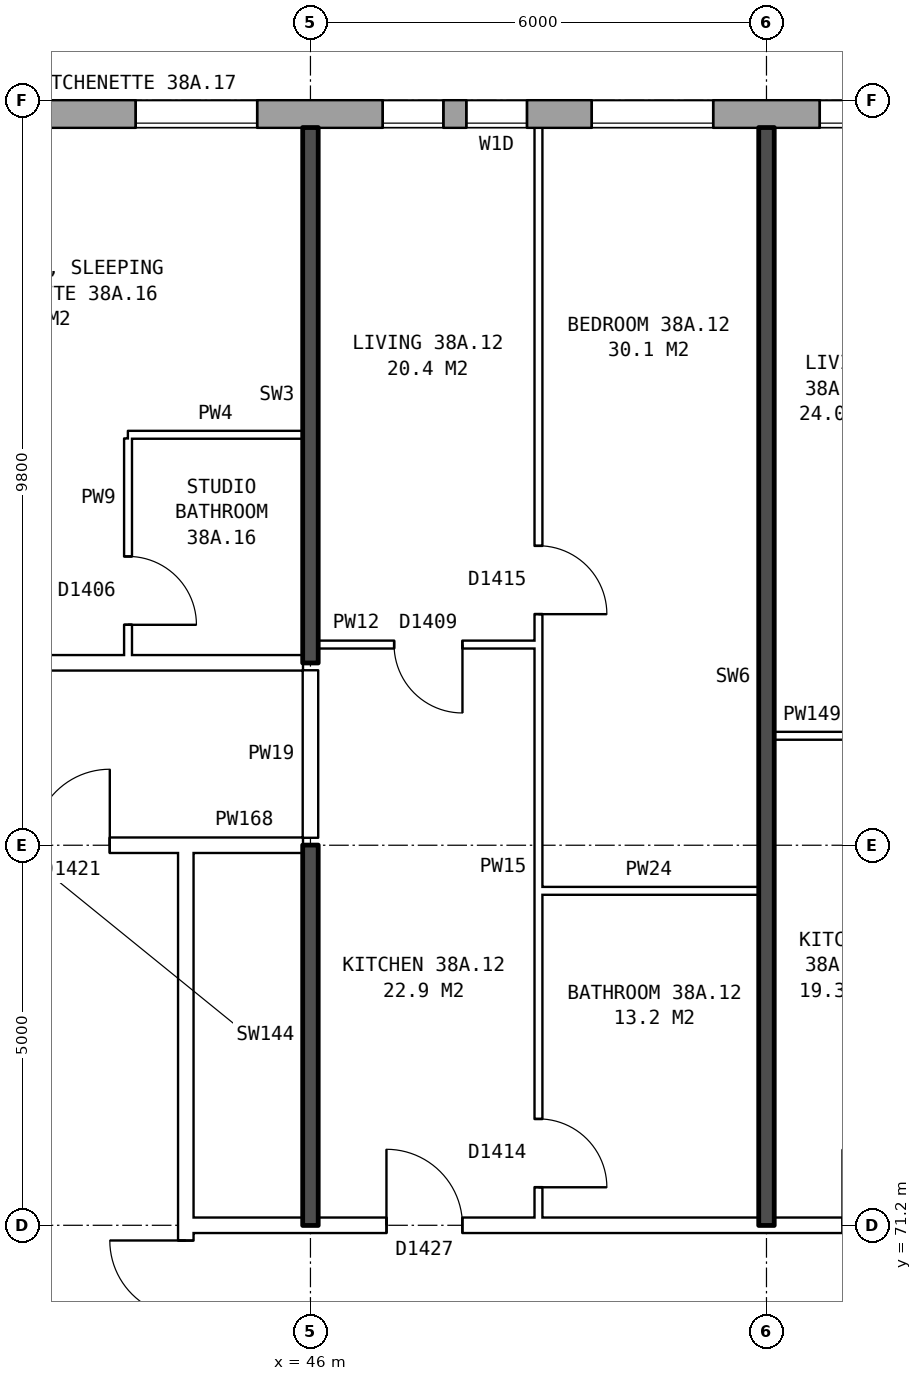
"""IFC4 building model, lengths in metres.
Left out: names, types, materials, properties, quantities, classifications, styles, units other than length and angle.
Written with IfcOpenShell. Run it as: python <this file> out.ifc"""

import sys

from ifc_helpers import new_model, si_unit, direction, frame, frame_2d, origin, place, context, subcontext, project, spatial, rectangle, extrude, element, fill, save


model = new_model("IFC4")
c1 = context("Model", 3, precision=1e-05, world=origin(), true_north=direction((0.0, 1.0)))
c2 = subcontext(c1, "Body", "Model", "MODEL_VIEW")
j1 = project(units=[si_unit("LENGTHUNIT", "METRE"), si_unit("PLANEANGLEUNIT", "RADIAN")], contexts=[c1])
p1 = place(None, origin())
s1 = spatial("IfcSite", under=j1, at=p1, CompositionType="ELEMENT")
p2 = place(p1, origin())
s2 = spatial("IfcBuilding", under=s1, at=p2, CompositionType="ELEMENT")
p3 = place(p2, frame((0.0, 0.0, 136.1)))
s3 = spatial("IfcBuildingStorey", under=s2, at=p3, CompositionType="ELEMENT", Elevation=136.1)
p4 = place(p3, frame((72.925, 85.82, 0.0), z_axis=(0.0, 0.0, 1.0), x_axis=(-1.0, 0.0, 0.0)))
e1 = element("IfcWall", 1, at=p4, inside=s3, PredefinedType="STANDARD", context=c2, shape_type="SweptSolid", body=[
    extrude(rectangle(XDim=43.101, YDim=0.36, at=frame_2d((21.55, 0.0))), origin(), (0.0, 0.0, 1.0), 2.85),
])
p5 = place(p4, frame((0.625, 0.0, 0.8)))
e2 = element("IfcOpeningElement", 2, at=p5, cuts=e1, PredefinedType="OPENING", context=c2, shape_type="SweptSolid", body=[
    extrude(rectangle(XDim=1.6, YDim=1.8, at=frame_2d((0.8, 0.9))), frame((0.0, 0.19, 0.0), z_axis=(0.0, -1.0, 0.0), x_axis=(1.0, 0.0, 0.0)), (0.0, 0.0, 1.0), 0.38),
])
p6 = place(p4, frame((3.625, 0.0, 0.8)))
e3 = element("IfcOpeningElement", 3, at=p6, cuts=e1, PredefinedType="OPENING", context=c2, shape_type="SweptSolid", body=[
    extrude(rectangle(XDim=1.6, YDim=1.8, at=frame_2d((0.8, 0.9))), frame((0.0, 0.19, 0.0), z_axis=(0.0, -1.0, 0.0), x_axis=(1.0, 0.0, 0.0)), (0.0, 0.0, 1.0), 0.38),
])
p7 = place(p4, frame((6.625, 0.0, 0.8)))
e4 = element("IfcOpeningElement", 4, at=p7, cuts=e1, PredefinedType="OPENING", context=c2, shape_type="SweptSolid", body=[
    extrude(rectangle(XDim=1.6, YDim=1.8, at=frame_2d((0.8, 0.9))), frame((0.0, 0.19, 0.0), z_axis=(0.0, -1.0, 0.0), x_axis=(1.0, 0.0, 0.0)), (0.0, 0.0, 1.0), 0.38),
])
p8 = place(p4, frame((9.625, 0.0, 0.8)))
e5 = element("IfcOpeningElement", 5, at=p8, cuts=e1, PredefinedType="OPENING", context=c2, shape_type="SweptSolid", body=[
    extrude(rectangle(XDim=1.6, YDim=1.8, at=frame_2d((0.8, 0.9))), frame((0.0, 0.19, 0.0), z_axis=(0.0, -1.0, 0.0), x_axis=(1.0, 0.0, 0.0)), (0.0, 0.0, 1.0), 0.38),
])
p9 = place(p4, frame((12.625, 0.0, 0.8)))
e6 = element("IfcOpeningElement", 6, at=p9, cuts=e1, PredefinedType="OPENING", context=c2, shape_type="SweptSolid", body=[
    extrude(rectangle(XDim=1.6, YDim=1.8, at=frame_2d((0.8, 0.9))), frame((0.0, 0.19, 0.0), z_axis=(0.0, -1.0, 0.0), x_axis=(1.0, 0.0, 0.0)), (0.0, 0.0, 1.0), 0.38),
])
p10 = place(p4, frame((15.125, 0.0, 1.35)))
e7 = element("IfcOpeningElement", 7, at=p10, cuts=e1, PredefinedType="OPENING", context=c2, shape_type="SweptSolid", body=[
    extrude(rectangle(XDim=1.0, YDim=1.2, at=frame_2d((0.5, 0.6))), frame((0.0, 0.19, 0.0), z_axis=(0.0, -1.0, 0.0), x_axis=(1.0, 0.0, 0.0)), (0.0, 0.0, 1.0), 0.38),
])
p11 = place(p4, frame((18.625, 0.0, 0.8)))
e8 = element("IfcOpeningElement", 8, at=p11, cuts=e1, PredefinedType="OPENING", context=c2, shape_type="SweptSolid", body=[
    extrude(rectangle(XDim=1.6, YDim=1.8, at=frame_2d((0.8, 0.9))), frame((0.0, 0.19, 0.0), z_axis=(0.0, -1.0, 0.0), x_axis=(1.0, 0.0, 0.0)), (0.0, 0.0, 1.0), 0.38),
])
p12 = place(p4, frame((21.625, 0.0, 0.8)))
e9 = element("IfcOpeningElement", 9, at=p12, cuts=e1, PredefinedType="OPENING", context=c2, shape_type="SweptSolid", body=[
    extrude(rectangle(XDim=1.6, YDim=1.8, at=frame_2d((0.8, 0.9))), frame((0.0, 0.19, 0.0), z_axis=(0.0, -1.0, 0.0), x_axis=(1.0, 0.0, 0.0)), (0.0, 0.0, 1.0), 0.38),
])
p13 = place(p4, frame((24.075, 0.0, 0.35)))
e10 = element("IfcOpeningElement", 10, at=p13, cuts=e1, PredefinedType="OPENING", context=c2, shape_type="SweptSolid", body=[
    extrude(rectangle(XDim=0.8, YDim=1.8, at=frame_2d((0.4, 0.9))), frame((0.0, 0.19, 0.0), z_axis=(0.0, -1.0, 0.0), x_axis=(1.0, 0.0, 0.0)), (0.0, 0.0, 1.0), 0.38),
])
p14 = place(p4, frame((27.625, 0.0, 0.8)))
e11 = element("IfcOpeningElement", 11, at=p14, cuts=e1, PredefinedType="OPENING", context=c2, shape_type="SweptSolid", body=[
    extrude(rectangle(XDim=1.6, YDim=1.8, at=frame_2d((0.8, 0.9))), frame((0.0, 0.19, 0.0), z_axis=(0.0, -1.0, 0.0), x_axis=(1.0, 0.0, 0.0)), (0.0, 0.0, 1.0), 0.38),
])
p15 = place(p4, frame((30.625, 0.0, 0.8)))
e12 = element("IfcOpeningElement", 12, at=p15, cuts=e1, PredefinedType="OPENING", context=c2, shape_type="SweptSolid", body=[
    extrude(rectangle(XDim=1.6, YDim=1.8, at=frame_2d((0.8, 0.9))), frame((0.0, 0.19, 0.0), z_axis=(0.0, -1.0, 0.0), x_axis=(1.0, 0.0, 0.0)), (0.0, 0.0, 1.0), 0.38),
])
p16 = place(p4, frame((33.625, 0.0, 0.8)))
e13 = element("IfcOpeningElement", 13, at=p16, cuts=e1, PredefinedType="OPENING", context=c2, shape_type="SweptSolid", body=[
    extrude(rectangle(XDim=1.6, YDim=1.8, at=frame_2d((0.8, 0.9))), frame((0.0, 0.19, 0.0), z_axis=(0.0, -1.0, 0.0), x_axis=(1.0, 0.0, 0.0)), (0.0, 0.0, 1.0), 0.38),
])
p17 = place(p4, frame((36.625, 0.0, 0.8)))
e14 = element("IfcOpeningElement", 14, at=p17, cuts=e1, PredefinedType="OPENING", context=c2, shape_type="SweptSolid", body=[
    extrude(rectangle(XDim=1.6, YDim=1.8, at=frame_2d((0.8, 0.9))), frame((0.0, 0.19, 0.0), z_axis=(0.0, -1.0, 0.0), x_axis=(1.0, 0.0, 0.0)), (0.0, 0.0, 1.0), 0.38),
])
p18 = place(p4, frame((39.625, 0.0, 0.8)))
e15 = element("IfcOpeningElement", 15, at=p18, cuts=e1, PredefinedType="OPENING", context=c2, shape_type="SweptSolid", body=[
    extrude(rectangle(XDim=1.6, YDim=1.8, at=frame_2d((0.8, 0.9))), frame((0.0, 0.19, 0.0), z_axis=(0.0, -1.0, 0.0), x_axis=(1.0, 0.0, 0.0)), (0.0, 0.0, 1.0), 0.38),
])
p19 = place(p4, frame((16.975, 0.0, 0.15)))
e16 = element("IfcOpeningElement", 16, at=p19, cuts=e1, PredefinedType="OPENING", context=c2, shape_type="SweptSolid", body=[
    extrude(rectangle(XDim=0.8, YDim=0.9, at=frame_2d((0.4, 0.45))), frame((0.0, 0.19, 0.0), z_axis=(0.0, -1.0, 0.0), x_axis=(1.0, 0.0, 0.0)), (0.0, 0.0, 1.0), 0.38),
])
p20 = place(p4, frame((25.175, 0.0, 0.25)))
e17 = element("IfcOpeningElement", 17, at=p20, cuts=e1, PredefinedType="OPENING", context=c2, shape_type="SweptSolid", body=[
    extrude(rectangle(XDim=0.8, YDim=0.9, at=frame_2d((0.4, 0.45))), frame((0.0, 0.19, 0.0), z_axis=(0.0, -1.0, 0.0), x_axis=(1.0, 0.0, 0.0)), (0.0, 0.0, 1.0), 0.38),
])
p21 = place(p3, frame((44.36, 63.9, 0.0), z_axis=(0.0, 0.0, 1.0), x_axis=(0.0, 1.0, 0.0)))
e18 = element("IfcWall", 18, at=p21, inside=s3, PredefinedType="PARTITIONING", context=c2, shape_type="SweptSolid", body=[
    extrude(rectangle(XDim=12.2, YDim=0.2, at=frame_2d((6.1, 0.0))), origin(), (0.0, 0.0, 1.0), 2.85),
])
p22 = place(p21, frame((5.1, 0.0, 0.0)))
e19 = element("IfcOpeningElement", 19, at=p22, cuts=e18, PredefinedType="OPENING", context=c2, shape_type="SweptSolid", body=[
    extrude(rectangle(XDim=2.0, YDim=2.1, at=frame_2d((1.0, 1.05))), frame((0.0, 0.11, 0.0), z_axis=(0.0, -1.0, 0.0), x_axis=(1.0, 0.0, 0.0)), (0.0, 0.0, 1.0), 0.22),
])
p23 = place(p3, frame((44.36, 71.2, 0.0), z_axis=(0.0, 0.0, 1.0), x_axis=(1.0, 0.0, 0.0)))
e20 = element("IfcWall", 20, at=p23, inside=s3, PredefinedType="PARTITIONING", context=c2, shape_type="SweptSolid", body=[
    extrude(rectangle(XDim=19.28, YDim=0.2, at=frame_2d((9.64, 0.0))), origin(), (0.0, 0.0, 1.0), 2.85),
])
p24 = place(p23, frame((17.46, 0.0, 0.0)))
e21 = element("IfcOpeningElement", 21, at=p24, cuts=e20, PredefinedType="OPENING", context=c2, shape_type="SweptSolid", body=[
    extrude(rectangle(XDim=1.0, YDim=2.1, at=frame_2d((0.5, 1.05))), frame((0.0, 0.11, 0.0), z_axis=(0.0, -1.0, 0.0), x_axis=(1.0, 0.0, 0.0)), (0.0, 0.0, 1.0), 0.22),
])
p25 = place(p23, frame((8.64, 0.0, 0.0)))
e22 = element("IfcOpeningElement", 22, at=p25, cuts=e20, PredefinedType="OPENING", context=c2, shape_type="SweptSolid", body=[
    extrude(rectangle(XDim=1.0, YDim=2.1, at=frame_2d((0.5, 1.05))), frame((0.0, 0.11, 0.0), z_axis=(0.0, -1.0, 0.0), x_axis=(1.0, 0.0, 0.0)), (0.0, 0.0, 1.0), 0.22),
])
p26 = place(p23, frame((2.64, 0.0, 0.0)))
e23 = element("IfcOpeningElement", 23, at=p26, cuts=e20, PredefinedType="OPENING", context=c2, shape_type="SweptSolid", body=[
    extrude(rectangle(XDim=1.0, YDim=2.1, at=frame_2d((0.5, 1.05))), frame((0.0, 0.11, 0.0), z_axis=(0.0, -1.0, 0.0), x_axis=(1.0, 0.0, 0.0)), (0.0, 0.0, 1.0), 0.22),
])
p27 = place(p3, frame((49.0, 75.6, 0.0), z_axis=(0.0, 0.0, 1.0), x_axis=(1.0, 0.0, 0.0)))
e24 = element("IfcWall", 24, at=p27, inside=s3, PredefinedType="PARTITIONING", context=c2, shape_type="SweptSolid", body=[
    extrude(rectangle(XDim=2.9, YDim=0.1, at=frame_2d((1.45, 0.0))), origin(), (0.0, 0.0, 1.0), 2.85),
])
p28 = place(p3, frame((41.36, 76.2, 0.0), z_axis=(0.0, 0.0, 1.0), x_axis=(1.0, 0.0, 0.0)))
e25 = element("IfcWall", 25, at=p28, inside=s3, PredefinedType="PARTITIONING", context=c2, shape_type="SweptSolid", body=[
    extrude(rectangle(XDim=3.0, YDim=0.2, at=frame_2d((1.5, 0.0))), origin(), (0.0, 0.0, 1.0), 2.85),
])
p29 = place(p28, frame((1.0, 0.0, 0.0)))
e26 = element("IfcOpeningElement", 26, at=p29, cuts=e25, PredefinedType="OPENING", context=c2, shape_type="SweptSolid", body=[
    extrude(rectangle(XDim=1.0, YDim=2.1, at=frame_2d((0.5, 1.05))), frame((0.0, 0.11, 0.0), z_axis=(0.0, -1.0, 0.0), x_axis=(1.0, 0.0, 0.0)), (0.0, 0.0, 1.0), 0.22),
])
p30 = place(p3, frame((44.36, 76.2, 0.0), z_axis=(0.0, 0.0, 1.0), x_axis=(1.0, 0.0, 0.0)))
e27 = element("IfcWall", 27, at=p30, inside=s3, PredefinedType="PARTITIONING", context=c2, shape_type="SweptSolid", body=[
    extrude(rectangle(XDim=1.54, YDim=0.2, at=frame_2d((0.77, 0.0))), origin(), (0.0, 0.0, 1.0), 2.85),
])
p31 = place(p3, frame((52.1, 77.64, 0.0), z_axis=(0.0, 0.0, 1.0), x_axis=(1.0, 0.0, 0.0)))
e28 = element("IfcWall", 28, at=p31, inside=s3, PredefinedType="PARTITIONING", context=c2, shape_type="SweptSolid", body=[
    extrude(rectangle(XDim=2.9, YDim=0.1, at=frame_2d((1.45, 0.0))), origin(), (0.0, 0.0, 1.0), 2.85),
])
p32 = place(p31, frame((1.0, 0.0, 0.0)))
e29 = element("IfcOpeningElement", 29, at=p32, cuts=e28, PredefinedType="OPENING", context=c2, shape_type="SweptSolid", body=[
    extrude(rectangle(XDim=0.9, YDim=2.1, at=frame_2d((0.45, 1.05))), frame((0.0, 0.06, 0.0), z_axis=(0.0, -1.0, 0.0), x_axis=(1.0, 0.0, 0.0)), (0.0, 0.0, 1.0), 0.12),
])
p33 = place(p3, frame((27.11, 78.6, 0.0), z_axis=(0.0, 0.0, 1.0), x_axis=(1.0, 0.0, 0.0)))
e30 = element("IfcWall", 30, at=p33, inside=s3, PredefinedType="PARTITIONING", context=c2, shape_type="SweptSolid", body=[
    extrude(rectangle(XDim=18.79, YDim=0.2, at=frame_2d((9.395, 0.0))), origin(), (0.0, 0.0, 1.0), 2.85),
])
p34 = place(p33, frame((14.19, 0.0, 0.0)))
e31 = element("IfcOpeningElement", 31, at=p34, cuts=e30, PredefinedType="OPENING", context=c2, shape_type="SweptSolid", body=[
    extrude(rectangle(XDim=1.0, YDim=2.1, at=frame_2d((0.5, 1.05))), frame((0.0, 0.11, 0.0), z_axis=(0.0, -1.0, 0.0), x_axis=(1.0, 0.0, 0.0)), (0.0, 0.0, 1.0), 0.22),
])
p35 = place(p33, frame((8.19, 0.0, 0.0)))
e32 = element("IfcOpeningElement", 32, at=p35, cuts=e30, PredefinedType="OPENING", context=c2, shape_type="SweptSolid", body=[
    extrude(rectangle(XDim=1.0, YDim=2.1, at=frame_2d((0.5, 1.05))), frame((0.0, 0.11, 0.0), z_axis=(0.0, -1.0, 0.0), x_axis=(1.0, 0.0, 0.0)), (0.0, 0.0, 1.0), 0.22),
])
p36 = place(p33, frame((4.59, 0.0, 0.0)))
e33 = element("IfcOpeningElement", 33, at=p36, cuts=e30, PredefinedType="OPENING", context=c2, shape_type="SweptSolid", body=[
    extrude(rectangle(XDim=1.0, YDim=2.1, at=frame_2d((0.5, 1.05))), frame((0.0, 0.11, 0.0), z_axis=(0.0, -1.0, 0.0), x_axis=(1.0, 0.0, 0.0)), (0.0, 0.0, 1.0), 0.22),
])
p37 = place(p3, frame((46.1, 78.84, 0.0), z_axis=(0.0, 0.0, 1.0), x_axis=(1.0, 0.0, 0.0)))
e34 = element("IfcWall", 34, at=p37, inside=s3, PredefinedType="PARTITIONING", context=c2, shape_type="SweptSolid", body=[
    extrude(rectangle(XDim=2.9, YDim=0.1, at=frame_2d((1.45, 0.0))), origin(), (0.0, 0.0, 1.0), 2.85),
])
p38 = place(p37, frame((1.0, 0.0, 0.0)))
e35 = element("IfcOpeningElement", 35, at=p38, cuts=e34, PredefinedType="OPENING", context=c2, shape_type="SweptSolid", body=[
    extrude(rectangle(XDim=0.9, YDim=2.1, at=frame_2d((0.45, 1.05))), frame((0.0, 0.06, 0.0), z_axis=(0.0, -1.0, 0.0), x_axis=(1.0, 0.0, 0.0)), (0.0, 0.0, 1.0), 0.12),
])
p39 = place(p3, frame((43.6, 81.6, 0.0), z_axis=(0.0, 0.0, 1.0), x_axis=(1.0, 0.0, 0.0)))
e36 = element("IfcWall", 36, at=p39, inside=s3, PredefinedType="PARTITIONING", context=c2, shape_type="SweptSolid", body=[
    extrude(rectangle(XDim=2.3, YDim=0.1, at=frame_2d((1.15, 0.0))), origin(), (0.0, 0.0, 1.0), 2.85),
])
p40 = place(p3, frame((43.6, 78.7, 0.0), z_axis=(0.0, 0.0, 1.0), x_axis=(0.0, 1.0, 0.0)))
e37 = element("IfcWall", 37, at=p40, inside=s3, PredefinedType="PARTITIONING", context=c2, shape_type="SweptSolid", body=[
    extrude(rectangle(XDim=2.85, YDim=0.1, at=frame_2d((1.425, 0.0))), origin(), (0.0, 0.0, 1.0), 2.85),
])
p41 = place(p40, frame((0.4, 0.0, 0.0)))
e38 = element("IfcOpeningElement", 38, at=p41, cuts=e37, PredefinedType="OPENING", context=c2, shape_type="SweptSolid", body=[
    extrude(rectangle(XDim=0.9, YDim=2.1, at=frame_2d((0.45, 1.05))), frame((0.0, 0.06, 0.0), z_axis=(0.0, -1.0, 0.0), x_axis=(1.0, 0.0, 0.0)), (0.0, 0.0, 1.0), 0.12),
])
p42 = place(p3, frame((46.0, 71.2, 0.0), z_axis=(0.0, 0.0, 1.0), x_axis=(0.0, 1.0, 0.0)))
e39 = element("IfcWall", 39, at=p42, inside=s3, PredefinedType="SOLIDWALL", context=c2, shape_type="SweptSolid", body=[
    extrude(rectangle(XDim=5.0, YDim=0.2, at=frame_2d((2.5, 0.0))), origin(), (0.0, 0.0, 1.0), 2.85),
])
p43 = place(p3, frame((46.0, 76.3, 0.0), z_axis=(0.0, 0.0, 1.0), x_axis=(0.0, 1.0, 0.0)))
e40 = element("IfcWall", 40, at=p43, inside=s3, PredefinedType="PARTITIONING", context=c2, shape_type="SweptSolid", body=[
    extrude(rectangle(XDim=2.2, YDim=0.2, at=frame_2d((1.1, 0.0))), origin(), (0.0, 0.0, 1.0), 2.85),
])
p44 = place(p3, frame((46.0, 78.6, 0.0), z_axis=(0.0, 0.0, 1.0), x_axis=(0.0, 1.0, 0.0)))
e41 = element("IfcWall", 41, at=p44, inside=s3, PredefinedType="SOLIDWALL", context=c2, shape_type="SweptSolid", body=[
    extrude(rectangle(XDim=7.04, YDim=0.2, at=frame_2d((3.52, 0.0))), origin(), (0.0, 0.0, 1.0), 2.85),
])
p45 = place(p3, frame((49.0, 71.3, 0.0), z_axis=(0.0, 0.0, 1.0), x_axis=(0.0, 1.0, 0.0)))
e42 = element("IfcWall", 42, at=p45, inside=s3, PredefinedType="PARTITIONING", context=c2, shape_type="SweptSolid", body=[
    extrude(rectangle(XDim=14.34, YDim=0.1, at=frame_2d((7.17, 0.0))), origin(), (0.0, 0.0, 1.0), 2.85),
])
p46 = place(p45, frame((7.94, 0.0, 0.0)))
e43 = element("IfcOpeningElement", 43, at=p46, cuts=e42, PredefinedType="OPENING", context=c2, shape_type="SweptSolid", body=[
    extrude(rectangle(XDim=0.9, YDim=2.1, at=frame_2d((0.45, 1.05))), frame((0.0, 0.06, 0.0), z_axis=(0.0, -1.0, 0.0), x_axis=(1.0, 0.0, 0.0)), (0.0, 0.0, 1.0), 0.12),
])
p47 = place(p45, frame((0.4, 0.0, 0.0)))
e44 = element("IfcOpeningElement", 44, at=p47, cuts=e42, PredefinedType="OPENING", context=c2, shape_type="SweptSolid", body=[
    extrude(rectangle(XDim=0.9, YDim=2.1, at=frame_2d((0.45, 1.05))), frame((0.0, 0.06, 0.0), z_axis=(0.0, -1.0, 0.0), x_axis=(1.0, 0.0, 0.0)), (0.0, 0.0, 1.0), 0.12),
])
p48 = place(p3, frame((52.0, 71.2, 0.0), z_axis=(0.0, 0.0, 1.0), x_axis=(0.0, 1.0, 0.0)))
e45 = element("IfcWall", 45, at=p48, inside=s3, PredefinedType="SOLIDWALL", context=c2, shape_type="SweptSolid", body=[
    extrude(rectangle(XDim=14.44, YDim=0.2, at=frame_2d((7.22, 0.0))), origin(), (0.0, 0.0, 1.0), 2.85),
])
p49 = place(p11, origin())
e46 = element("IfcWindow", 46, at=p49, inside=s3, PartitioningType="SINGLE_PANEL", PredefinedType="WINDOW", context=c2, shape_type="SweptSolid", body=[
    extrude(rectangle(XDim=1.6, YDim=1.8, at=frame_2d((0.8, 0.9))), frame((0.0, 0.15, 0.0), z_axis=(0.0, -1.0, 0.0), x_axis=(1.0, 0.0, 0.0)), (0.0, 0.0, 1.0), 0.06),
])
fill(e8, e46)
p50 = place(p12, origin())
e47 = element("IfcWindow", 47, at=p50, inside=s3, PartitioningType="SINGLE_PANEL", PredefinedType="WINDOW", context=c2, shape_type="SweptSolid", body=[
    extrude(rectangle(XDim=1.6, YDim=1.8, at=frame_2d((0.8, 0.9))), frame((0.0, 0.15, 0.0), z_axis=(0.0, -1.0, 0.0), x_axis=(1.0, 0.0, 0.0)), (0.0, 0.0, 1.0), 0.06),
])
fill(e9, e47)
p51 = place(p13, origin())
e48 = element("IfcWindow", 48, at=p51, inside=s3, PartitioningType="SINGLE_PANEL", PredefinedType="WINDOW", context=c2, shape_type="SweptSolid", body=[
    extrude(rectangle(XDim=0.8, YDim=1.8, at=frame_2d((0.4, 0.9))), frame((0.0, 0.15, 0.0), z_axis=(0.0, -1.0, 0.0), x_axis=(1.0, 0.0, 0.0)), (0.0, 0.0, 1.0), 0.06),
])
fill(e10, e48)
p52 = place(p14, origin())
e49 = element("IfcWindow", 49, at=p52, inside=s3, PartitioningType="SINGLE_PANEL", PredefinedType="WINDOW", context=c2, shape_type="SweptSolid", body=[
    extrude(rectangle(XDim=1.6, YDim=1.8, at=frame_2d((0.8, 0.9))), frame((0.0, 0.15, 0.0), z_axis=(0.0, -1.0, 0.0), x_axis=(1.0, 0.0, 0.0)), (0.0, 0.0, 1.0), 0.06),
])
fill(e11, e49)
p53 = place(p22, origin())
e50 = element("IfcDoor", 50, at=p53, inside=s3, OperationType="DOUBLE_DOOR_SINGLE_SWING", PredefinedType="DOOR", context=c2, shape_type="SweptSolid", body=[
    extrude(rectangle(XDim=2.0, YDim=2.1, at=frame_2d((1.0, 1.05))), frame((0.0, 0.025, 0.0), z_axis=(0.0, -1.0, 0.0), x_axis=(1.0, 0.0, 0.0)), (0.0, 0.0, 1.0), 0.05),
])
fill(e19, e50)
p54 = place(p29, origin())
e51 = element("IfcDoor", 51, at=p54, inside=s3, OperationType="SINGLE_SWING_RIGHT", PredefinedType="DOOR", context=c2, shape_type="SweptSolid", body=[
    extrude(rectangle(XDim=1.0, YDim=2.1, at=frame_2d((0.5, 1.05))), frame((0.0, 0.025, 0.0), z_axis=(0.0, -1.0, 0.0), x_axis=(1.0, 0.0, 0.0)), (0.0, 0.0, 1.0), 0.05),
])
fill(e26, e51)
p55 = place(p46, frame((0.9, 0.0, 0.0), z_axis=(0.0, 0.0, 1.0), x_axis=(-1.0, 0.0, 0.0)))
e52 = element("IfcDoor", 52, at=p55, inside=s3, OperationType="SINGLE_SWING_RIGHT", PredefinedType="DOOR", context=c2, shape_type="SweptSolid", body=[
    extrude(rectangle(XDim=0.9, YDim=2.1, at=frame_2d((0.45, 1.05))), frame((0.0, 0.025, 0.0), z_axis=(0.0, -1.0, 0.0), x_axis=(1.0, 0.0, 0.0)), (0.0, 0.0, 1.0), 0.05),
])
fill(e43, e52)
p56 = place(p26, origin())
e53 = element("IfcDoor", 53, at=p56, inside=s3, OperationType="SINGLE_SWING_LEFT", PredefinedType="DOOR", context=c2, shape_type="SweptSolid", body=[
    extrude(rectangle(XDim=1.0, YDim=2.1, at=frame_2d((0.5, 1.05))), frame((0.0, 0.025, 0.0), z_axis=(0.0, -1.0, 0.0), x_axis=(1.0, 0.0, 0.0)), (0.0, 0.0, 1.0), 0.05),
])
fill(e23, e53)
p57 = place(p38, frame((0.9, 0.0, 0.0), z_axis=(0.0, 0.0, 1.0), x_axis=(-1.0, 0.0, 0.0)))
e54 = element("IfcDoor", 54, at=p57, inside=s3, OperationType="SINGLE_SWING_LEFT", PredefinedType="DOOR", context=c2, shape_type="SweptSolid", body=[
    extrude(rectangle(XDim=0.9, YDim=2.1, at=frame_2d((0.45, 1.05))), frame((0.0, 0.025, 0.0), z_axis=(0.0, -1.0, 0.0), x_axis=(1.0, 0.0, 0.0)), (0.0, 0.0, 1.0), 0.05),
])
fill(e35, e54)
p58 = place(p47, frame((0.9, 0.0, 0.0), z_axis=(0.0, 0.0, 1.0), x_axis=(-1.0, 0.0, 0.0)))
e55 = element("IfcDoor", 55, at=p58, inside=s3, OperationType="SINGLE_SWING_RIGHT", PredefinedType="DOOR", context=c2, shape_type="SweptSolid", body=[
    extrude(rectangle(XDim=0.9, YDim=2.1, at=frame_2d((0.45, 1.05))), frame((0.0, 0.025, 0.0), z_axis=(0.0, -1.0, 0.0), x_axis=(1.0, 0.0, 0.0)), (0.0, 0.0, 1.0), 0.05),
])
fill(e44, e55)
p59 = place(p41, frame((0.9, 0.0, 0.0), z_axis=(0.0, 0.0, 1.0), x_axis=(-1.0, 0.0, 0.0)))
e56 = element("IfcDoor", 56, at=p59, inside=s3, OperationType="SINGLE_SWING_RIGHT", PredefinedType="DOOR", context=c2, shape_type="SweptSolid", body=[
    extrude(rectangle(XDim=0.9, YDim=2.1, at=frame_2d((0.45, 1.05))), frame((0.0, 0.025, 0.0), z_axis=(0.0, -1.0, 0.0), x_axis=(1.0, 0.0, 0.0)), (0.0, 0.0, 1.0), 0.05),
])
fill(e38, e56)
p60 = place(p20, origin())
e57 = element("IfcWindow", 57, at=p60, inside=s3, PartitioningType="SINGLE_PANEL", PredefinedType="WINDOW", context=c2, shape_type="SweptSolid", body=[
    extrude(rectangle(XDim=0.8, YDim=0.9, at=frame_2d((0.4, 0.45))), frame((0.0, 0.15, 0.0), z_axis=(0.0, -1.0, 0.0), x_axis=(1.0, 0.0, 0.0)), (0.0, 0.0, 1.0), 0.06),
])
fill(e17, e57)
save(model, sys.argv[1])
